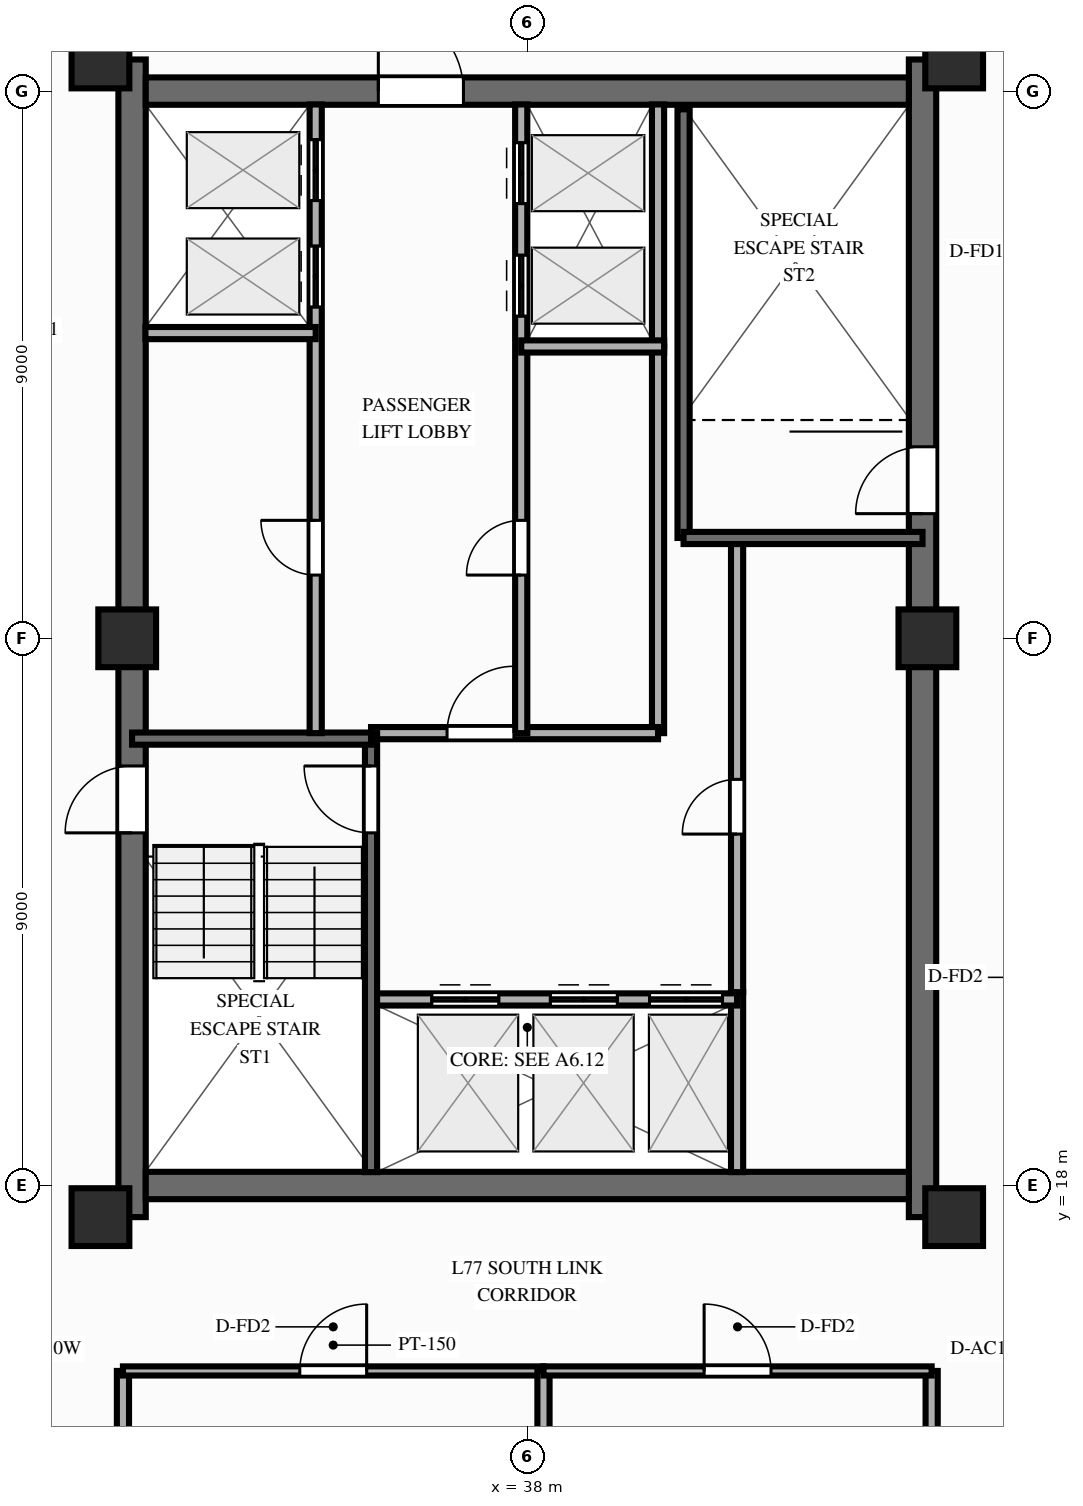
"""IFC4 building model, lengths in metres.
Left out: names, types, materials, properties, quantities, classifications, styles, units other than length and angle.
Written with IfcOpenShell. Run it as: python <this file> out.ifc"""

import sys

from ifc_helpers import new_model, si_unit, direction, frame, frame_2d, origin, origin_2d, place, context, subcontext, project, spatial, rectangle, extrude, source, transform, mapped, element, fill, save


model = new_model("IFC4")
c1 = context("Model", 3, precision=1e-05, world=origin(), true_north=direction((0.0, 1.0)))
c2 = subcontext(c1, "Body", "Model", "MODEL_VIEW")
j1 = project(units=[si_unit("LENGTHUNIT", "METRE"), si_unit("PLANEANGLEUNIT", "RADIAN")], contexts=[c1])
p1 = place(None, origin())
s1 = spatial("IfcSite", under=j1, at=p1, CompositionType="ELEMENT")
p2 = place(p1, origin())
s2 = spatial("IfcBuilding", under=s1, at=p2, CompositionType="ELEMENT")
p3 = place(p2, frame((0.0, 0.0, 249.0)))
s3 = spatial("IfcBuildingStorey", under=s2, at=p3, CompositionType="ELEMENT", Elevation=249.0)
p4 = place(p3, frame((31.5, 17.48, 0.0), z_axis=(0.0, 0.0, 1.0), x_axis=(0.0, 1.0, 0.0)))
e1 = element("IfcWall", 1, at=p4, inside=s3, PredefinedType="SHEAR", context=c2, shape_type="SweptSolid", body=[
    extrude(rectangle(XDim=19.04, YDim=0.45, at=frame_2d((9.52, 0.0))), origin(), (0.0, 0.0, 1.0), 3.2),
])
p5 = place(p4, frame((6.32, 0.0, 0.0)))
e2 = element("IfcOpeningElement", 2, at=p5, cuts=e1, PredefinedType="OPENING", context=c2, shape_type="SweptSolid", body=[
    extrude(rectangle(XDim=1.1, YDim=2.15, at=frame_2d((0.55, 1.075))), frame((0.0, 0.237, 0.0), z_axis=(0.0, -1.0, 0.0), x_axis=(1.0, 0.0, 0.0)), (0.0, 0.0, 1.0), 0.474),
])
p6 = place(p3, frame((44.5, 17.48, 0.0), z_axis=(0.0, 0.0, 1.0), x_axis=(0.0, 1.0, 0.0)))
e3 = element("IfcWall", 3, at=p6, inside=s3, PredefinedType="SHEAR", context=c2, shape_type="SweptSolid", body=[
    extrude(rectangle(XDim=19.04, YDim=0.45, at=frame_2d((9.52, 0.0))), origin(), (0.0, 0.0, 1.0), 3.2),
])
p7 = place(p6, frame((12.67, 0.0, 0.0), z_axis=(0.0, 0.0, 1.0), x_axis=(-1.0, 0.0, 0.0)))
e4 = element("IfcOpeningElement", 4, at=p7, cuts=e3, PredefinedType="OPENING", context=c2, shape_type="SweptSolid", body=[
    extrude(rectangle(XDim=1.1, YDim=2.15, at=frame_2d((0.55, 1.075))), frame((0.0, 0.237, 0.0), z_axis=(0.0, -1.0, 0.0), x_axis=(1.0, 0.0, 0.0)), (0.0, 0.0, 1.0), 0.474),
])
p8 = place(p3, frame((31.725, 18.0, 0.0), z_axis=(0.0, 0.0, 1.0), x_axis=(1.0, 0.0, 0.0)))
e5 = element("IfcWall", 5, at=p8, inside=s3, PredefinedType="SHEAR", context=c2, shape_type="SweptSolid", body=[
    extrude(rectangle(XDim=12.55, YDim=0.45, at=frame_2d((6.275, 0.0))), origin(), (0.0, 0.0, 1.0), 3.2),
])
p9 = place(p3, frame((31.725, 36.0, 0.0), z_axis=(0.0, 0.0, 1.0), x_axis=(1.0, 0.0, 0.0)))
e6 = element("IfcWall", 6, at=p9, inside=s3, PredefinedType="SHEAR", context=c2, shape_type="SweptSolid", body=[
    extrude(rectangle(XDim=12.55, YDim=0.45, at=frame_2d((6.275, 0.0))), origin(), (0.0, 0.0, 1.0), 3.2),
])
p10 = place(p9, frame((5.225, 0.0, 0.0), z_axis=(0.0, 0.0, 1.0), x_axis=(-1.0, 0.0, 0.0)))
e7 = element("IfcOpeningElement", 7, at=p10, cuts=e6, PredefinedType="OPENING", context=c2, shape_type="SweptSolid", body=[
    extrude(rectangle(XDim=1.4, YDim=2.15, at=frame_2d((0.7, 1.075))), frame((0.0, 0.237, 0.0), z_axis=(0.0, -1.0, 0.0), x_axis=(1.0, 0.0, 0.0)), (0.0, 0.0, 1.0), 0.474),
])
m1 = source(origin(), c2, "Body", "SweptSolid", [
    extrude(rectangle(XDim=0.95, YDim=0.95, at=origin_2d()), origin(), (0.0, 0.0, 1.0), 3.2),
])
for number, where, z_axis, x_axis in (
    (8, (30.98, 17.48, 0.0), (0.0, 0.0, 1.0), (1.0, 0.0, 0.0)),
    (9, (45.02, 17.48, 0.0), (0.0, 0.0, 1.0), (1.0, 0.0, 0.0)),
    (10, (30.98, 36.52, 0.0), (0.0, 0.0, 1.0), (1.0, 0.0, 0.0)),
    (11, (45.02, 36.52, 0.0), (0.0, 0.0, 1.0), (1.0, 0.0, 0.0)),
    (12, (31.42, 27.0, 0.0), (0.0, 0.0, 1.0), (1.0, 0.0, 0.0)),
    (13, (44.58, 27.0, 0.0), (0.0, 0.0, 1.0), (1.0, 0.0, 0.0)),
):
    element("IfcColumn", number, at=place(p3, frame(where, z_axis=z_axis, x_axis=x_axis)), inside=s3, PredefinedType="COLUMN", context=c2, shape_type="MappedRepresentation", body=[
        mapped(m1, transform((0.0, 0.0, 0.0), scale=1.0)),
    ])
p11 = place(p3, frame((41.45, 18.22, 0.0), z_axis=(0.0, 0.0, 1.0), x_axis=(0.0, 1.0, 0.0)))
e14 = element("IfcWall", 14, at=p11, inside=s3, PredefinedType="PARTITIONING", context=c2, shape_type="SweptSolid", body=[
    extrude(rectangle(XDim=2.96, YDim=0.2, at=frame_2d((1.48, 0.0))), origin(), (0.0, 0.0, 1.0), 2.88),
])
p12 = place(p3, frame((41.45, 21.18, 0.0), z_axis=(0.0, 0.0, 1.0), x_axis=(0.0, 1.0, 0.0)))
e15 = element("IfcWall", 15, at=p12, inside=s3, PredefinedType="PARTITIONING", context=c2, shape_type="SweptSolid", body=[
    extrude(rectangle(XDim=7.42, YDim=0.2, at=frame_2d((3.71, 0.0))), origin(), (0.0, 0.0, 1.0), 2.88),
])
p13 = place(p12, frame((2.6, 0.0, 0.0)))
e16 = element("IfcOpeningElement", 16, at=p13, cuts=e15, PredefinedType="OPENING", context=c2, shape_type="SweptSolid", body=[
    extrude(rectangle(XDim=0.9, YDim=2.1, at=frame_2d((0.45, 1.05))), frame((0.0, 0.112, 0.0), z_axis=(0.0, -1.0, 0.0), x_axis=(1.0, 0.0, 0.0)), (0.0, 0.0, 1.0), 0.224),
])
p14 = place(p3, frame((40.15, 25.44, 0.0), z_axis=(0.0, 0.0, 1.0), x_axis=(0.0, 1.0, 0.0)))
e17 = element("IfcWall", 17, at=p14, inside=s3, PredefinedType="PARTITIONING", context=c2, shape_type="SweptSolid", body=[
    extrude(rectangle(XDim=6.36, YDim=0.2, at=frame_2d((3.18, 0.0))), origin(), (0.0, 0.0, 1.0), 2.88),
])
p15 = place(p3, frame((40.15, 31.8, 0.0), z_axis=(0.0, 0.0, 1.0), x_axis=(0.0, 1.0, 0.0)))
e18 = element("IfcWall", 18, at=p15, inside=s3, PredefinedType="PARTITIONING", context=c2, shape_type="SweptSolid", body=[
    extrude(rectangle(XDim=3.98, YDim=0.2, at=frame_2d((1.99, 0.0))), origin(), (0.0, 0.0, 1.0), 2.88),
])
p16 = place(p3, frame((35.43, 21.06, 0.0), z_axis=(0.0, 0.0, 1.0), x_axis=(1.0, 0.0, 0.0)))
e19 = element("IfcWall", 19, at=p16, inside=s3, PredefinedType="PARTITIONING", context=c2, shape_type="SweptSolid", body=[
    extrude(rectangle(XDim=6.02, YDim=0.2, at=frame_2d((3.01, 0.0))), origin(), (0.0, 0.0, 1.0), 2.88),
])
p17 = place(p16, frame((1.0, 0.0, 0.0)))
e20 = element("IfcOpeningElement", 20, at=p17, cuts=e19, PredefinedType="OPENING", context=c2, shape_type="SweptSolid", body=[
    extrude(rectangle(XDim=1.1, YDim=2.15, at=frame_2d((0.55, 1.075))), frame((0.0, 0.112, 0.0), z_axis=(0.0, -1.0, 0.0), x_axis=(1.0, 0.0, 0.0)), (0.0, 0.0, 1.0), 0.224),
])
p18 = place(p16, frame((2.95, 0.0, 0.0)))
e21 = element("IfcOpeningElement", 21, at=p18, cuts=e19, PredefinedType="OPENING", context=c2, shape_type="SweptSolid", body=[
    extrude(rectangle(XDim=1.1, YDim=2.15, at=frame_2d((0.55, 1.075))), frame((0.0, 0.112, 0.0), z_axis=(0.0, -1.0, 0.0), x_axis=(1.0, 0.0, 0.0)), (0.0, 0.0, 1.0), 0.224),
])
p19 = place(p16, frame((4.58, 0.0, 0.0)))
e22 = element("IfcOpeningElement", 22, at=p19, cuts=e19, PredefinedType="OPENING", context=c2, shape_type="SweptSolid", body=[
    extrude(rectangle(XDim=1.2, YDim=2.15, at=frame_2d((0.6, 1.075))), frame((0.0, 0.112, 0.0), z_axis=(0.0, -1.0, 0.0), x_axis=(1.0, 0.0, 0.0)), (0.0, 0.0, 1.0), 0.224),
])
p20 = place(p3, frame((35.43, 25.44, 0.0), z_axis=(0.0, 0.0, 1.0), x_axis=(1.0, 0.0, 0.0)))
e23 = element("IfcWall", 23, at=p20, inside=s3, PredefinedType="PARTITIONING", context=c2, shape_type="SweptSolid", body=[
    extrude(rectangle(XDim=4.72, YDim=0.2, at=frame_2d((2.36, 0.0))), origin(), (0.0, 0.0, 1.0), 2.88),
])
p21 = place(p20, frame((1.25, 0.0, 0.0)))
e24 = element("IfcOpeningElement", 24, at=p21, cuts=e23, PredefinedType="OPENING", context=c2, shape_type="SweptSolid", body=[
    extrude(rectangle(XDim=1.1, YDim=2.15, at=frame_2d((0.55, 1.075))), frame((0.0, 0.112, 0.0), z_axis=(0.0, -1.0, 0.0), x_axis=(1.0, 0.0, 0.0)), (0.0, 0.0, 1.0), 0.224),
])
p22 = place(p3, frame((35.43, 18.22, 0.0), z_axis=(0.0, 0.0, 1.0), x_axis=(0.0, 1.0, 0.0)))
e25 = element("IfcWall", 25, at=p22, inside=s3, PredefinedType="SOLIDWALL", context=c2, shape_type="SweptSolid", body=[
    extrude(rectangle(XDim=7.22, YDim=0.2, at=frame_2d((3.61, 0.0))), origin(), (0.0, 0.0, 1.0), 2.88),
])
p23 = place(p22, frame((6.68, 0.0, 0.0), z_axis=(0.0, 0.0, 1.0), x_axis=(-1.0, 0.0, 0.0)))
e26 = element("IfcOpeningElement", 26, at=p23, cuts=e25, PredefinedType="OPENING", context=c2, shape_type="SweptSolid", body=[
    extrude(rectangle(XDim=1.1, YDim=2.15, at=frame_2d((0.55, 1.075))), frame((0.0, 0.112, 0.0), z_axis=(0.0, -1.0, 0.0), x_axis=(1.0, 0.0, 0.0)), (0.0, 0.0, 1.0), 0.224),
])
p24 = place(p3, frame((31.5, 25.35, 0.0), z_axis=(0.0, 0.0, 1.0), x_axis=(1.0, 0.0, 0.0)))
e27 = element("IfcWall", 27, at=p24, inside=s3, PredefinedType="SOLIDWALL", context=c2, shape_type="SweptSolid", body=[
    extrude(rectangle(XDim=3.93, YDim=0.2, at=frame_2d((1.965, 0.0))), origin(), (0.0, 0.0, 1.0), 2.88),
])
p25 = place(p3, frame((40.57, 28.65, 0.0), z_axis=(0.0, 0.0, 1.0), x_axis=(0.0, 1.0, 0.0)))
e28 = element("IfcWall", 28, at=p25, inside=s3, PredefinedType="SOLIDWALL", context=c2, shape_type="SweptSolid", body=[
    extrude(rectangle(XDim=7.05, YDim=0.2, at=frame_2d((3.525, 0.0))), origin(), (0.0, 0.0, 1.0), 2.88),
])
p26 = place(p3, frame((40.57, 28.65, 0.0), z_axis=(0.0, 0.0, 1.0), x_axis=(1.0, 0.0, 0.0)))
e29 = element("IfcWall", 29, at=p26, inside=s3, PredefinedType="SOLIDWALL", context=c2, shape_type="SweptSolid", body=[
    extrude(rectangle(XDim=3.93, YDim=0.2, at=frame_2d((1.965, 0.0))), origin(), (0.0, 0.0, 1.0), 2.88),
])
p27 = place(p3, frame((34.52, 25.44, 0.0), z_axis=(0.0, 0.0, 1.0), x_axis=(0.0, 1.0, 0.0)))
e30 = element("IfcWall", 30, at=p27, inside=s3, PredefinedType="PARTITIONING", context=c2, shape_type="SweptSolid", body=[
    extrude(rectangle(XDim=10.34, YDim=0.2, at=frame_2d((5.17, 0.0))), origin(), (0.0, 0.0, 1.0), 2.88),
])
p28 = place(p27, frame((2.6, 0.0, 0.0)))
e31 = element("IfcOpeningElement", 31, at=p28, cuts=e30, PredefinedType="OPENING", context=c2, shape_type="SweptSolid", body=[
    extrude(rectangle(XDim=0.9, YDim=2.1, at=frame_2d((0.45, 1.05))), frame((0.0, 0.112, 0.0), z_axis=(0.0, -1.0, 0.0), x_axis=(1.0, 0.0, 0.0)), (0.0, 0.0, 1.0), 0.224),
])
p29 = place(p27, frame((7.01, 0.0, 0.0)))
e32 = element("IfcOpeningElement", 32, at=p29, cuts=e30, PredefinedType="OPENING", context=c2, shape_type="SweptSolid", body=[
    extrude(rectangle(XDim=1.0, YDim=2.15, at=frame_2d((0.5, 1.075))), frame((0.0, 0.112, 0.0), z_axis=(0.0, -1.0, 0.0), x_axis=(1.0, 0.0, 0.0)), (0.0, 0.0, 1.0), 0.224),
])
p30 = place(p27, frame((8.76, 0.0, 0.0)))
e33 = element("IfcOpeningElement", 33, at=p30, cuts=e30, PredefinedType="OPENING", context=c2, shape_type="SweptSolid", body=[
    extrude(rectangle(XDim=1.0, YDim=2.15, at=frame_2d((0.5, 1.075))), frame((0.0, 0.112, 0.0), z_axis=(0.0, -1.0, 0.0), x_axis=(1.0, 0.0, 0.0)), (0.0, 0.0, 1.0), 0.224),
])
p31 = place(p3, frame((31.72, 32.02, 0.0), z_axis=(0.0, 0.0, 1.0), x_axis=(1.0, 0.0, 0.0)))
e34 = element("IfcWall", 34, at=p31, inside=s3, PredefinedType="PARTITIONING", context=c2, shape_type="SweptSolid", body=[
    extrude(rectangle(XDim=2.8, YDim=0.2, at=frame_2d((1.4, 0.0))), origin(), (0.0, 0.0, 1.0), 2.88),
])
p32 = place(p3, frame((37.9, 25.44, 0.0), z_axis=(0.0, 0.0, 1.0), x_axis=(0.0, 1.0, 0.0)))
e35 = element("IfcWall", 35, at=p32, inside=s3, PredefinedType="PARTITIONING", context=c2, shape_type="SweptSolid", body=[
    extrude(rectangle(XDim=10.34, YDim=0.2, at=frame_2d((5.17, 0.0))), origin(), (0.0, 0.0, 1.0), 2.88),
])
p33 = place(p32, frame((2.6, 0.0, 0.0)))
e36 = element("IfcOpeningElement", 36, at=p33, cuts=e35, PredefinedType="OPENING", context=c2, shape_type="SweptSolid", body=[
    extrude(rectangle(XDim=0.9, YDim=2.1, at=frame_2d((0.45, 1.05))), frame((0.0, 0.112, 0.0), z_axis=(0.0, -1.0, 0.0), x_axis=(1.0, 0.0, 0.0)), (0.0, 0.0, 1.0), 0.224),
])
p34 = place(p32, frame((6.86, 0.0, 0.0)))
e37 = element("IfcOpeningElement", 37, at=p34, cuts=e35, PredefinedType="OPENING", context=c2, shape_type="SweptSolid", body=[
    extrude(rectangle(XDim=1.0, YDim=2.15, at=frame_2d((0.5, 1.075))), frame((0.0, 0.112, 0.0), z_axis=(0.0, -1.0, 0.0), x_axis=(1.0, 0.0, 0.0)), (0.0, 0.0, 1.0), 0.224),
])
p35 = place(p32, frame((8.71, 0.0, 0.0)))
e38 = element("IfcOpeningElement", 38, at=p35, cuts=e35, PredefinedType="OPENING", context=c2, shape_type="SweptSolid", body=[
    extrude(rectangle(XDim=1.0, YDim=2.15, at=frame_2d((0.5, 1.075))), frame((0.0, 0.112, 0.0), z_axis=(0.0, -1.0, 0.0), x_axis=(1.0, 0.0, 0.0)), (0.0, 0.0, 1.0), 0.224),
])
p36 = place(p3, frame((37.9, 31.8, 0.0), z_axis=(0.0, 0.0, 1.0), x_axis=(1.0, 0.0, 0.0)))
e39 = element("IfcWall", 39, at=p36, inside=s3, PredefinedType="PARTITIONING", context=c2, shape_type="SweptSolid", body=[
    extrude(rectangle(XDim=2.35, YDim=0.2, at=frame_2d((1.175, 0.0))), origin(), (0.0, 0.0, 1.0), 2.88),
])
for number, where, z_axis, x_axis in (
    (40, (31.35, 14.95, 0.0), (0.0, 0.0, 1.0), (0.0, -1.0, 0.0)),
    (41, (44.65, 14.95, 0.0), (0.0, 0.0, 1.0), (0.0, -1.0, 0.0)),
):
    element("IfcWall", number, at=place(p3, frame(where, z_axis=z_axis, x_axis=x_axis)), inside=s3, PredefinedType="PARTITIONING", context=c2, shape_type="SweptSolid", body=[
        extrude(rectangle(XDim=8.8, YDim=0.2, at=frame_2d((4.4, 0.0))), origin(), (0.0, 0.0, 1.0), 2.59),
    ])
p37 = place(p3, frame((31.35, 14.95, 0.0), z_axis=(0.0, 0.0, 1.0), x_axis=(1.0, 0.0, 0.0)))
e42 = element("IfcWall", 42, at=p37, inside=s3, PredefinedType="PARTITIONING", context=c2, shape_type="SweptSolid", body=[
    extrude(rectangle(XDim=6.916, YDim=0.15, at=frame_2d((3.458, 0.0))), origin(), (0.0, 0.0, 1.0), 2.88),
])
p38 = place(p37, frame((2.908, 0.0, 0.0)))
e43 = element("IfcOpeningElement", 43, at=p38, cuts=e42, PredefinedType="OPENING", context=c2, shape_type="SweptSolid", body=[
    extrude(rectangle(XDim=1.1, YDim=2.15, at=frame_2d((0.55, 1.075))), frame((0.0, 0.087, 0.0), z_axis=(0.0, -1.0, 0.0), x_axis=(1.0, 0.0, 0.0)), (0.0, 0.0, 1.0), 0.174),
])
p39 = place(p3, frame((38.266, 14.95, 0.0), z_axis=(0.0, 0.0, 1.0), x_axis=(0.0, -1.0, 0.0)))
e44 = element("IfcWall", 44, at=p39, inside=s3, PredefinedType="PARTITIONING", context=c2, shape_type="SweptSolid", body=[
    extrude(rectangle(XDim=8.8, YDim=0.2, at=frame_2d((4.4, 0.0))), origin(), (0.0, 0.0, 1.0), 2.88),
])
p40 = place(p3, frame((38.266, 14.95, 0.0), z_axis=(0.0, 0.0, 1.0), x_axis=(1.0, 0.0, 0.0)))
e45 = element("IfcWall", 45, at=p40, inside=s3, PredefinedType="PARTITIONING", context=c2, shape_type="SweptSolid", body=[
    extrude(rectangle(XDim=6.384, YDim=0.15, at=frame_2d((3.192, 0.0))), origin(), (0.0, 0.0, 1.0), 2.88),
])
p41 = place(p40, frame((2.642, 0.0, 0.0)))
e46 = element("IfcOpeningElement", 46, at=p41, cuts=e45, PredefinedType="OPENING", context=c2, shape_type="SweptSolid", body=[
    extrude(rectangle(XDim=1.1, YDim=2.15, at=frame_2d((0.55, 1.075))), frame((0.0, 0.087, 0.0), z_axis=(0.0, -1.0, 0.0), x_axis=(1.0, 0.0, 0.0)), (0.0, 0.0, 1.0), 0.174),
])
m2 = source(origin(), c2, "Body", "SweptSolid", [
    extrude(rectangle(XDim=1.1, YDim=2.15, at=frame_2d((0.55, 1.075))), frame((0.0, 0.025, 0.0), z_axis=(0.0, -1.0, 0.0), x_axis=(1.0, 0.0, 0.0)), (0.0, 0.0, 1.0), 0.05),
])
p42 = place(p5, origin())
e47 = element("IfcDoor", 47, at=p42, inside=s3, OperationType="SINGLE_SWING_LEFT", PredefinedType="DOOR", context=c2, shape_type="MappedRepresentation", body=[
    mapped(m2, transform((0.0, 0.0, 0.0), scale=1.0)),
])
fill(e2, e47)
p43 = place(p7, origin())
e48 = element("IfcDoor", 48, at=p43, inside=s3, OperationType="SINGLE_SWING_RIGHT", PredefinedType="DOOR", context=c2, shape_type="MappedRepresentation", body=[
    mapped(m2, transform((0.0, 0.0, 0.0), scale=1.0)),
])
fill(e4, e48)
m3 = source(origin(), c2, "Body", "SweptSolid", [
    extrude(rectangle(XDim=1.4, YDim=2.15, at=frame_2d((0.7, 1.075))), frame((0.0, 0.025, 0.0), z_axis=(0.0, -1.0, 0.0), x_axis=(1.0, 0.0, 0.0)), (0.0, 0.0, 1.0), 0.05),
])
p44 = place(p10, origin())
e49 = element("IfcDoor", 49, at=p44, inside=s3, OperationType="SINGLE_SWING_RIGHT", PredefinedType="DOOR", context=c2, shape_type="MappedRepresentation", body=[
    mapped(m3, transform((0.0, 0.0, 0.0), scale=1.0)),
])
fill(e7, e49)
m4 = source(origin(), c2, "Body", "SweptSolid", [
    extrude(rectangle(XDim=0.9, YDim=2.1, at=frame_2d((0.45, 1.05))), frame((0.0, 0.025, 0.0), z_axis=(0.0, -1.0, 0.0), x_axis=(1.0, 0.0, 0.0)), (0.0, 0.0, 1.0), 0.05),
])
p45 = place(p13, origin())
e50 = element("IfcDoor", 50, at=p45, inside=s3, OperationType="SINGLE_SWING_LEFT", PredefinedType="DOOR", context=c2, shape_type="MappedRepresentation", body=[
    mapped(m4, transform((0.0, 0.0, 0.0), scale=1.0)),
])
fill(e16, e50)
p46 = place(p17, origin())
e51 = element("IfcDoor", 51, at=p46, inside=s3, OperationType="DOUBLE_DOOR_SLIDING", PredefinedType="DOOR", context=c2, shape_type="MappedRepresentation", body=[
    mapped(m2, transform((0.0, 0.0, 0.0), scale=1.0)),
])
fill(e20, e51)
p47 = place(p18, origin())
e52 = element("IfcDoor", 52, at=p47, inside=s3, OperationType="DOUBLE_DOOR_SLIDING", PredefinedType="DOOR", context=c2, shape_type="MappedRepresentation", body=[
    mapped(m2, transform((0.0, 0.0, 0.0), scale=1.0)),
])
fill(e21, e52)
m5 = source(origin(), c2, "Body", "SweptSolid", [
    extrude(rectangle(XDim=1.2, YDim=2.15, at=frame_2d((0.6, 1.075))), frame((0.0, 0.025, 0.0), z_axis=(0.0, -1.0, 0.0), x_axis=(1.0, 0.0, 0.0)), (0.0, 0.0, 1.0), 0.05),
])
p48 = place(p19, origin())
e53 = element("IfcDoor", 53, at=p48, inside=s3, OperationType="DOUBLE_DOOR_SLIDING", PredefinedType="DOOR", context=c2, shape_type="MappedRepresentation", body=[
    mapped(m5, transform((0.0, 0.0, 0.0), scale=1.0)),
])
fill(e22, e53)
p49 = place(p21, origin())
e54 = element("IfcDoor", 54, at=p49, inside=s3, OperationType="SINGLE_SWING_RIGHT", PredefinedType="DOOR", context=c2, shape_type="MappedRepresentation", body=[
    mapped(m2, transform((0.0, 0.0, 0.0), scale=1.0)),
])
fill(e24, e54)
p50 = place(p23, origin())
e55 = element("IfcDoor", 55, at=p50, inside=s3, OperationType="SINGLE_SWING_LEFT", PredefinedType="DOOR", context=c2, shape_type="MappedRepresentation", body=[
    mapped(m2, transform((0.0, 0.0, 0.0), scale=1.0)),
])
fill(e26, e55)
p51 = place(p28, origin())
e56 = element("IfcDoor", 56, at=p51, inside=s3, OperationType="SINGLE_SWING_RIGHT", PredefinedType="DOOR", context=c2, shape_type="MappedRepresentation", body=[
    mapped(m4, transform((0.0, 0.0, 0.0), scale=1.0)),
])
fill(e31, e56)
m6 = source(origin(), c2, "Body", "SweptSolid", [
    extrude(rectangle(XDim=1.0, YDim=2.15, at=frame_2d((0.5, 1.075))), frame((0.0, 0.025, 0.0), z_axis=(0.0, -1.0, 0.0), x_axis=(1.0, 0.0, 0.0)), (0.0, 0.0, 1.0), 0.05),
])
p52 = place(p29, origin())
e57 = element("IfcDoor", 57, at=p52, inside=s3, OperationType="DOUBLE_DOOR_SLIDING", PredefinedType="DOOR", context=c2, shape_type="MappedRepresentation", body=[
    mapped(m6, transform((0.0, 0.0, 0.0), scale=1.0)),
])
fill(e32, e57)
p53 = place(p30, origin())
e58 = element("IfcDoor", 58, at=p53, inside=s3, OperationType="DOUBLE_DOOR_SLIDING", PredefinedType="DOOR", context=c2, shape_type="MappedRepresentation", body=[
    mapped(m6, transform((0.0, 0.0, 0.0), scale=1.0)),
])
fill(e33, e58)
p54 = place(p33, origin())
e59 = element("IfcDoor", 59, at=p54, inside=s3, OperationType="SINGLE_SWING_LEFT", PredefinedType="DOOR", context=c2, shape_type="MappedRepresentation", body=[
    mapped(m4, transform((0.0, 0.0, 0.0), scale=1.0)),
])
fill(e36, e59)
p55 = place(p34, origin())
e60 = element("IfcDoor", 60, at=p55, inside=s3, OperationType="DOUBLE_DOOR_SLIDING", PredefinedType="DOOR", context=c2, shape_type="MappedRepresentation", body=[
    mapped(m6, transform((0.0, 0.0, 0.0), scale=1.0)),
])
fill(e37, e60)
p56 = place(p35, origin())
e61 = element("IfcDoor", 61, at=p56, inside=s3, OperationType="DOUBLE_DOOR_SLIDING", PredefinedType="DOOR", context=c2, shape_type="MappedRepresentation", body=[
    mapped(m6, transform((0.0, 0.0, 0.0), scale=1.0)),
])
fill(e38, e61)
p57 = place(p38, origin())
e62 = element("IfcDoor", 62, at=p57, inside=s3, OperationType="SINGLE_SWING_RIGHT", PredefinedType="DOOR", context=c2, shape_type="MappedRepresentation", body=[
    mapped(m2, transform((0.0, 0.0, 0.0), scale=1.0)),
])
fill(e43, e62)
p58 = place(p41, origin())
e63 = element("IfcDoor", 63, at=p58, inside=s3, OperationType="SINGLE_SWING_LEFT", PredefinedType="DOOR", context=c2, shape_type="MappedRepresentation", body=[
    mapped(m2, transform((0.0, 0.0, 0.0), scale=1.0)),
])
fill(e46, e63)
save(model, sys.argv[1])
